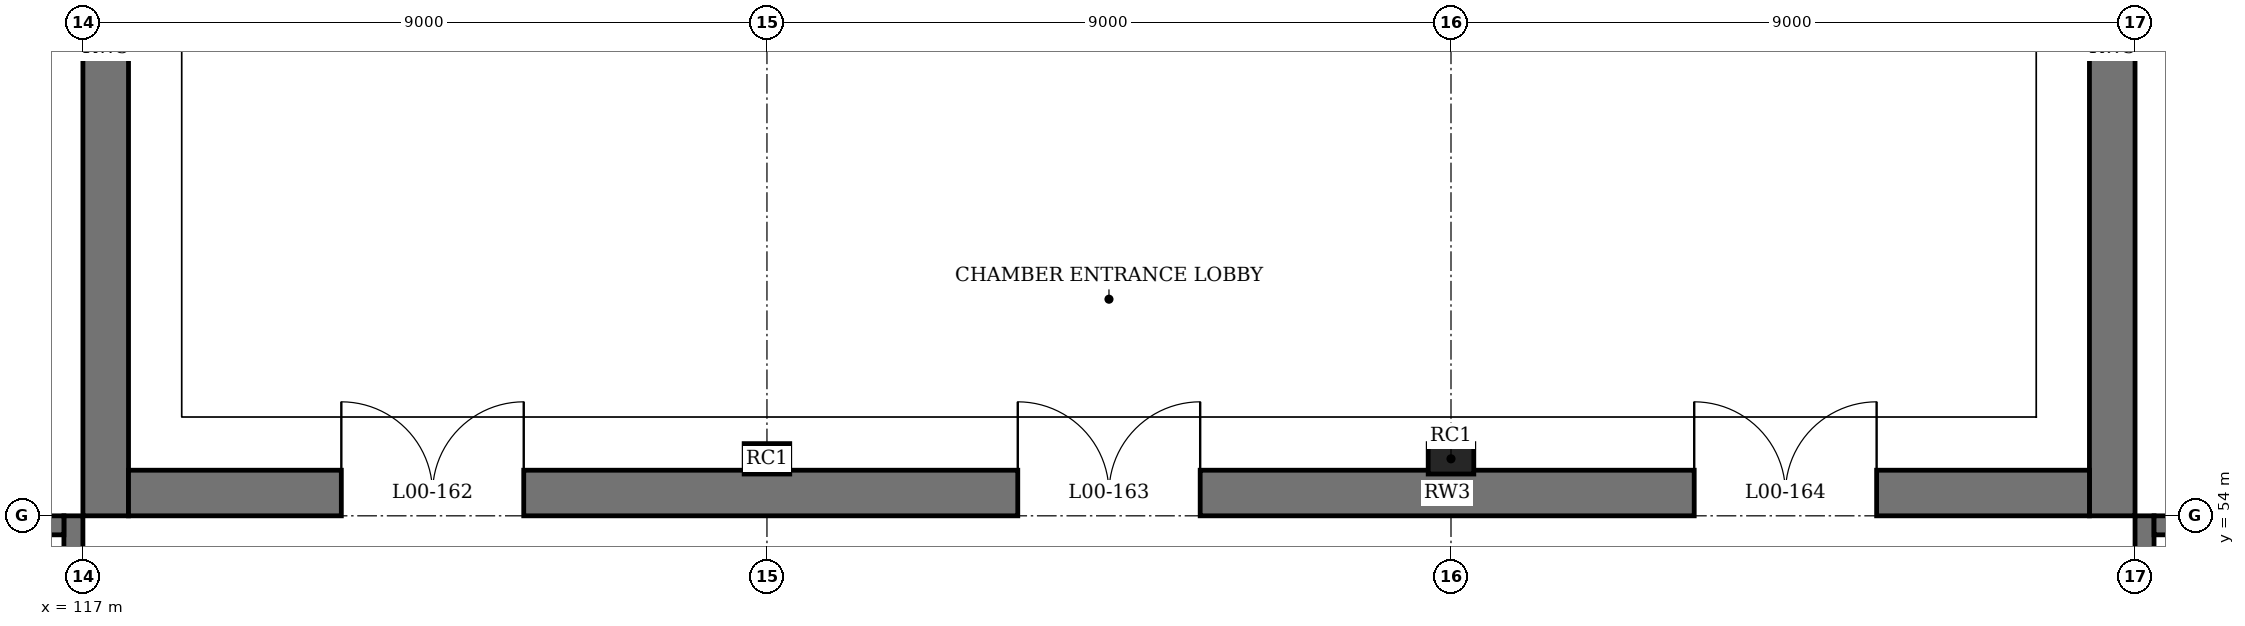
"""IFC4 building model, lengths in metres.
Left out: names, types, materials, properties, quantities, classifications, styles, units other than length and angle.
Written with IfcOpenShell. Run it as: python <this file> out.ifc"""

import sys

from ifc_helpers import new_model, si_unit, direction, frame, frame_2d, origin, origin_2d, place, context, subcontext, project, spatial, rectangle, extrude, element, fill, save


model = new_model("IFC4")
c1 = context("Model", 3, precision=1e-05, world=origin(), true_north=direction((0.0, 1.0)))
c2 = subcontext(c1, "Body", "Model", "MODEL_VIEW")
j1 = project(units=[si_unit("LENGTHUNIT", "METRE"), si_unit("PLANEANGLEUNIT", "RADIAN")], contexts=[c1])
p1 = place(None, origin())
s1 = spatial("IfcSite", under=j1, at=p1, CompositionType="ELEMENT")
p2 = place(p1, origin())
s2 = spatial("IfcBuilding", under=s1, at=p2, CompositionType="ELEMENT")
p3 = place(p2, origin())
s3 = spatial("IfcBuildingStorey", under=s2, at=p3, CompositionType="ELEMENT", Elevation=0.0)
p4 = place(p3, frame((116.875, 45.0, 0.0), z_axis=(0.0, 0.0, 1.0), x_axis=(0.0, 1.0, 0.0)))
e1 = element("IfcWall", 1, at=p4, inside=s3, PredefinedType="SHEAR", context=c2, shape_type="SweptSolid", body=[
    extrude(rectangle(XDim=9.0, YDim=0.25, at=frame_2d((4.5, 0.0))), origin(), (0.0, 0.0, 1.0), 6.0),
])
p5 = place(p4, frame((1.75, 0.0, 0.0)))
e2 = element("IfcOpeningElement", 2, at=p5, cuts=e1, PredefinedType="OPENING", context=c2, shape_type="SweptSolid", body=[
    extrude(rectangle(XDim=1.0, YDim=2.1, at=frame_2d((0.5, 1.05))), frame((0.0, 0.135, 0.0), z_axis=(0.0, -1.0, 0.0), x_axis=(1.0, 0.0, 0.0)), (0.0, 0.0, 1.0), 0.27),
])
p6 = place(p3, frame((108.25, 53.875, 0.0), z_axis=(0.0, 0.0, 1.0), x_axis=(1.0, 0.0, 0.0)))
e3 = element("IfcWall", 3, at=p6, inside=s3, PredefinedType="SHEAR", context=c2, shape_type="SweptSolid", body=[
    extrude(rectangle(XDim=8.5, YDim=0.25, at=frame_2d((4.25, 0.0))), origin(), (0.0, 0.0, 1.0), 6.0),
])
p7 = place(p3, frame((144.125, 45.0, 0.0), z_axis=(0.0, 0.0, 1.0), x_axis=(0.0, 1.0, 0.0)))
e4 = element("IfcWall", 4, at=p7, inside=s3, PredefinedType="SHEAR", context=c2, shape_type="SweptSolid", body=[
    extrude(rectangle(XDim=9.0, YDim=0.25, at=frame_2d((4.5, 0.0))), origin(), (0.0, 0.0, 1.0), 6.0),
])
p8 = place(p3, frame((144.25, 53.875, 0.0), z_axis=(0.0, 0.0, 1.0), x_axis=(1.0, 0.0, 0.0)))
e5 = element("IfcWall", 5, at=p8, inside=s3, PredefinedType="SHEAR", context=c2, shape_type="SweptSolid", body=[
    extrude(rectangle(XDim=8.5, YDim=0.25, at=frame_2d((4.25, 0.0))), origin(), (0.0, 0.0, 1.0), 6.0),
])
p9 = place(p8, frame((6.95, 0.0, 0.0)))
e6 = element("IfcOpeningElement", 6, at=p9, cuts=e5, PredefinedType="OPENING", context=c2, shape_type="SweptSolid", body=[
    extrude(rectangle(XDim=1.0, YDim=2.1, at=frame_2d((0.5, 1.05))), frame((0.0, 0.135, 0.0), z_axis=(0.0, -1.0, 0.0), x_axis=(1.0, 0.0, 0.0)), (0.0, 0.0, 1.0), 0.27),
])
p10 = place(p3, frame((117.3, 54.0, 0.0), z_axis=(0.0, 0.0, 1.0), x_axis=(0.0, 1.0, 0.0)))
e7 = element("IfcWall", 7, at=p10, inside=s3, PredefinedType="SHEAR", context=c2, shape_type="SweptSolid", body=[
    extrude(rectangle(XDim=26.4, YDim=0.6, at=frame_2d((13.2, 0.0))), origin(), (0.0, 0.0, 1.0), 6.0),
])
p11 = place(p10, frame((12.3, 0.0, 0.0)))
e8 = element("IfcOpeningElement", 8, at=p11, cuts=e7, PredefinedType="OPENING", context=c2, shape_type="SweptSolid", body=[
    extrude(rectangle(XDim=2.4, YDim=2.4, at=frame_2d((1.2, 1.2))), frame((0.0, 0.31, 0.0), z_axis=(0.0, -1.0, 0.0), x_axis=(1.0, 0.0, 0.0)), (0.0, 0.0, 1.0), 0.62),
])
p12 = place(p3, frame((143.7, 54.0, 0.0), z_axis=(0.0, 0.0, 1.0), x_axis=(0.0, 1.0, 0.0)))
e9 = element("IfcWall", 9, at=p12, inside=s3, PredefinedType="SHEAR", context=c2, shape_type="SweptSolid", body=[
    extrude(rectangle(XDim=26.4, YDim=0.6, at=frame_2d((13.2, 0.0))), origin(), (0.0, 0.0, 1.0), 6.0),
])
p13 = place(p12, frame((12.3, 0.0, 0.0)))
e10 = element("IfcOpeningElement", 10, at=p13, cuts=e9, PredefinedType="OPENING", context=c2, shape_type="SweptSolid", body=[
    extrude(rectangle(XDim=2.4, YDim=2.4, at=frame_2d((1.2, 1.2))), frame((0.0, 0.31, 0.0), z_axis=(0.0, -1.0, 0.0), x_axis=(1.0, 0.0, 0.0)), (0.0, 0.0, 1.0), 0.62),
])
p14 = place(p3, frame((117.6, 54.3, 0.0), z_axis=(0.0, 0.0, 1.0), x_axis=(1.0, 0.0, 0.0)))
e11 = element("IfcWall", 11, at=p14, inside=s3, PredefinedType="SHEAR", context=c2, shape_type="SweptSolid", body=[
    extrude(rectangle(XDim=25.8, YDim=0.6, at=frame_2d((12.9, 0.0))), origin(), (0.0, 0.0, 1.0), 6.0),
])
p15 = place(p14, frame((2.8, 0.0, 0.0)))
e12 = element("IfcOpeningElement", 12, at=p15, cuts=e11, PredefinedType="OPENING", context=c2, shape_type="SweptSolid", body=[
    extrude(rectangle(XDim=2.4, YDim=2.4, at=frame_2d((1.2, 1.2))), frame((0.0, 0.31, 0.0), z_axis=(0.0, -1.0, 0.0), x_axis=(1.0, 0.0, 0.0)), (0.0, 0.0, 1.0), 0.62),
])
p16 = place(p14, frame((11.7, 0.0, 0.0)))
e13 = element("IfcOpeningElement", 13, at=p16, cuts=e11, PredefinedType="OPENING", context=c2, shape_type="SweptSolid", body=[
    extrude(rectangle(XDim=2.4, YDim=2.4, at=frame_2d((1.2, 1.2))), frame((0.0, 0.31, 0.0), z_axis=(0.0, -1.0, 0.0), x_axis=(1.0, 0.0, 0.0)), (0.0, 0.0, 1.0), 0.62),
])
p17 = place(p14, frame((20.6, 0.0, 0.0)))
e14 = element("IfcOpeningElement", 14, at=p17, cuts=e11, PredefinedType="OPENING", context=c2, shape_type="SweptSolid", body=[
    extrude(rectangle(XDim=2.4, YDim=2.4, at=frame_2d((1.2, 1.2))), frame((0.0, 0.31, 0.0), z_axis=(0.0, -1.0, 0.0), x_axis=(1.0, 0.0, 0.0)), (0.0, 0.0, 1.0), 0.62),
])
for number, where, z_axis, x_axis in (
    (15, (126.0, 54.75, 0.0), (0.0, 0.0, 1.0), (1.0, 0.0, 0.0)),
    (16, (135.0, 54.75, 0.0), (0.0, 0.0, 1.0), (1.0, 0.0, 0.0)),
):
    element("IfcColumn", number, at=place(p3, frame(where, z_axis=z_axis, x_axis=x_axis)), inside=s3, PredefinedType="PILASTER", context=c2, shape_type="SweptSolid", body=[
        extrude(rectangle(XDim=0.6, YDim=0.4, at=origin_2d()), origin(), (0.0, 0.0, 1.0), 6.0),
    ])
p18 = place(p15, origin())
e17 = element("IfcDoor", 17, at=p18, inside=s3, OperationType="DOUBLE_DOOR_SINGLE_SWING", PredefinedType="DOOR", context=c2, shape_type="SweptSolid", body=[
    extrude(rectangle(XDim=2.4, YDim=2.4, at=frame_2d((1.2, 1.2))), frame((0.0, 0.025, 0.0), z_axis=(0.0, -1.0, 0.0), x_axis=(1.0, 0.0, 0.0)), (0.0, 0.0, 1.0), 0.05),
])
fill(e12, e17)
p19 = place(p16, origin())
e18 = element("IfcDoor", 18, at=p19, inside=s3, OperationType="DOUBLE_DOOR_SINGLE_SWING", PredefinedType="DOOR", context=c2, shape_type="SweptSolid", body=[
    extrude(rectangle(XDim=2.4, YDim=2.4, at=frame_2d((1.2, 1.2))), frame((0.0, 0.025, 0.0), z_axis=(0.0, -1.0, 0.0), x_axis=(1.0, 0.0, 0.0)), (0.0, 0.0, 1.0), 0.05),
])
fill(e13, e18)
p20 = place(p17, origin())
e19 = element("IfcDoor", 19, at=p20, inside=s3, OperationType="DOUBLE_DOOR_SINGLE_SWING", PredefinedType="DOOR", context=c2, shape_type="SweptSolid", body=[
    extrude(rectangle(XDim=2.4, YDim=2.4, at=frame_2d((1.2, 1.2))), frame((0.0, 0.025, 0.0), z_axis=(0.0, -1.0, 0.0), x_axis=(1.0, 0.0, 0.0)), (0.0, 0.0, 1.0), 0.05),
])
fill(e14, e19)
save(model, sys.argv[1])
